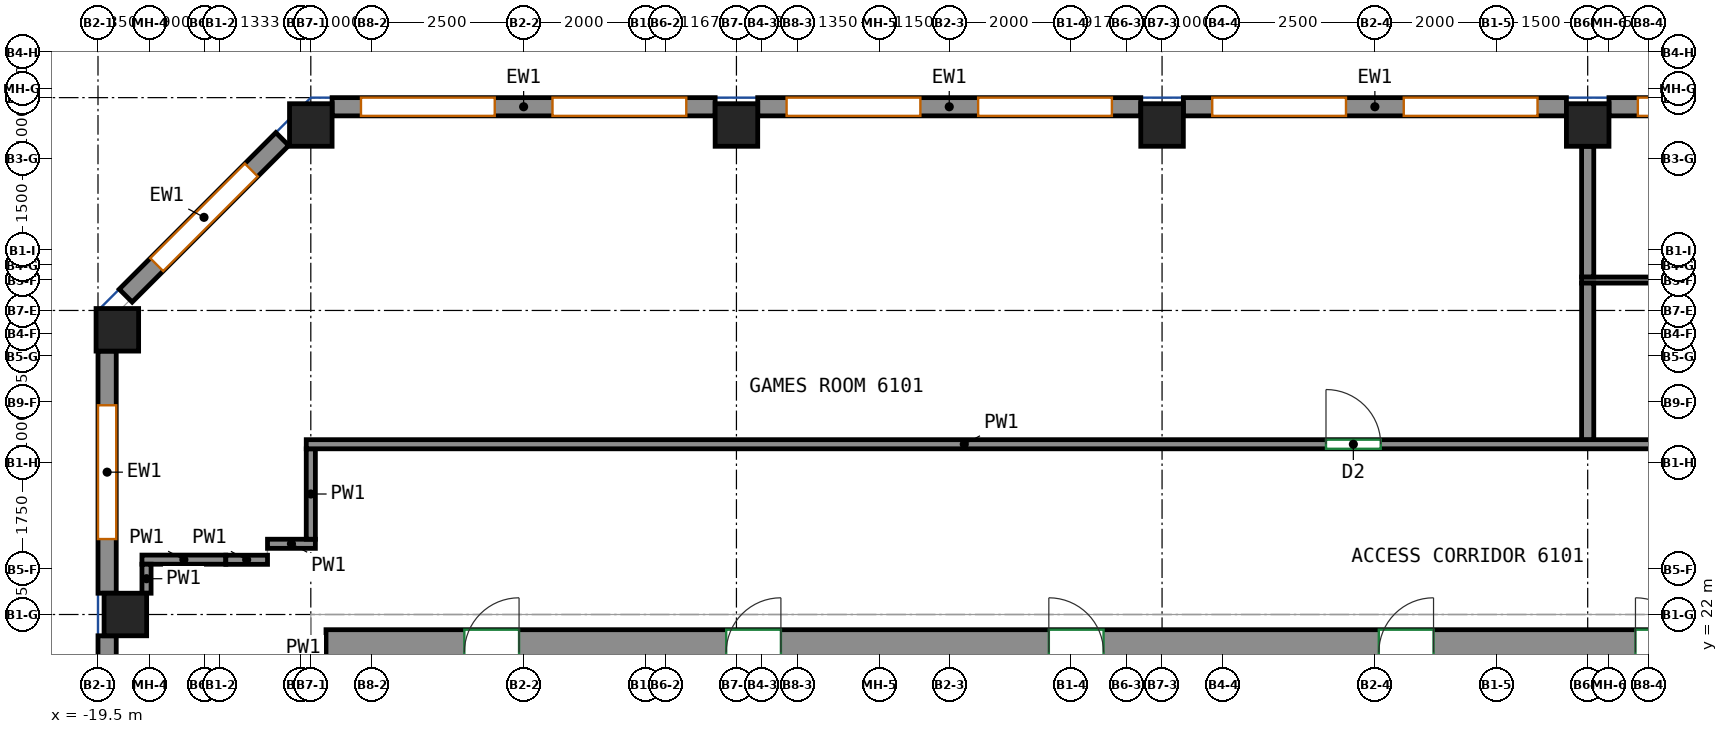
"""IFC4 building model, lengths in metres.
Left out: names, types, materials, properties, quantities, classifications, styles, units other than length and angle.
Written with IfcOpenShell. Run it as: python <this file> out.ifc"""

import sys

from ifc_helpers import new_model, si_unit, direction, frame, frame_2d, origin, origin_2d, place, context, subcontext, project, spatial, rectangle, extrude, source, transform, mapped, element, fill, save


model = new_model("IFC4")
c1 = context("Model", 3, precision=1e-05, world=origin(), true_north=direction((0.0, 1.0)))
c2 = subcontext(c1, "Body", "Model", "MODEL_VIEW")
j1 = project(units=[si_unit("LENGTHUNIT", "METRE"), si_unit("PLANEANGLEUNIT", "RADIAN")], contexts=[c1])
p1 = place(None, origin())
s1 = spatial("IfcSite", under=j1, at=p1, CompositionType="ELEMENT")
p2 = place(p1, origin())
s2 = spatial("IfcBuilding", under=s1, at=p2, CompositionType="ELEMENT")
p3 = place(p2, frame((0.0, 0.0, 252.6)))
s3 = spatial("IfcBuildingStorey", under=s2, at=p3, CompositionType="ELEMENT", Elevation=252.6)
m1 = source(origin(), c2, "Body", "SweptSolid", [
    extrude(rectangle(XDim=0.7, YDim=0.7, at=origin_2d()), origin(), (0.0, 0.0, 1.0), 3.12),
])
for number, where, z_axis, x_axis in (
    (1, (-19.182, 26.682, 0.0), (0.0, 0.0, 1.0), (1.0, 0.0, 0.0)),
    (2, (-19.05, 22.0, 0.0), (0.0, 0.0, 1.0), (1.0, 0.0, 0.0)),
    (3, (-16.0, 30.05, 0.0), (0.0, 0.0, 1.0), (1.0, 0.0, 0.0)),
    (4, (-9.0, 30.05, 0.0), (0.0, 0.0, 1.0), (1.0, 0.0, 0.0)),
    (5, (-2.0, 30.05, 0.0), (0.0, 0.0, 1.0), (1.0, 0.0, 0.0)),
    (6, (5.0, 30.05, 0.0), (0.0, 0.0, 1.0), (1.0, 0.0, 0.0)),
):
    element("IfcColumn", number, at=place(p3, frame(where, z_axis=z_axis, x_axis=x_axis)), inside=s3, PredefinedType="COLUMN", context=c2, shape_type="MappedRepresentation", body=[
        mapped(m1, transform((0.0, 0.0, 0.0))),
    ])
m2 = source(origin(), c2, "Body", "SweptSolid", [
    extrude(rectangle(XDim=33.6, YDim=0.75, at=frame_2d((16.8, 0.0))), origin(), (0.0, 0.0, 1.0), 3.12),
])
p4 = place(p3, frame((-15.75, 21.375, 0.0), z_axis=(0.0, 0.0, 1.0), x_axis=(1.0, 0.0, 0.0)))
e7 = element("IfcWall", 7, at=p4, inside=s3, PredefinedType="SHEAR", context=c2, shape_type="MappedRepresentation", body=[
    mapped(m2, transform((0.0, 0.0, 0.0))),
])
p5 = place(p4, frame((6.581, 0.0, 0.0)))
e8 = element("IfcOpeningElement", 8, at=p5, cuts=e7, PredefinedType="OPENING", context=c2, shape_type="SweptSolid", body=[
    extrude(rectangle(XDim=0.9, YDim=2.1, at=frame_2d((0.45, 1.05))), frame((0.0, 0.385, 0.0), z_axis=(0.0, -1.0, 0.0), x_axis=(1.0, 0.0, 0.0)), (0.0, 0.0, 1.0), 0.77),
])
p6 = place(p4, frame((11.888, 0.0, 0.0)))
e9 = element("IfcOpeningElement", 9, at=p6, cuts=e7, PredefinedType="OPENING", context=c2, shape_type="SweptSolid", body=[
    extrude(rectangle(XDim=0.9, YDim=2.1, at=frame_2d((0.45, 1.05))), frame((0.0, 0.385, 0.0), z_axis=(0.0, -1.0, 0.0), x_axis=(1.0, 0.0, 0.0)), (0.0, 0.0, 1.0), 0.77),
])
p7 = place(p4, frame((17.315, 0.0, 0.0)))
e10 = element("IfcOpeningElement", 10, at=p7, cuts=e7, PredefinedType="OPENING", context=c2, shape_type="SweptSolid", body=[
    extrude(rectangle(XDim=0.9, YDim=2.1, at=frame_2d((0.45, 1.05))), frame((0.0, 0.385, 0.0), z_axis=(0.0, -1.0, 0.0), x_axis=(1.0, 0.0, 0.0)), (0.0, 0.0, 1.0), 0.77),
])
p8 = place(p4, frame((21.536, 0.0, 0.0)))
e11 = element("IfcOpeningElement", 11, at=p8, cuts=e7, PredefinedType="OPENING", context=c2, shape_type="SweptSolid", body=[
    extrude(rectangle(XDim=0.9, YDim=2.1, at=frame_2d((0.45, 1.05))), frame((0.0, 0.385, 0.0), z_axis=(0.0, -1.0, 0.0), x_axis=(1.0, 0.0, 0.0)), (0.0, 0.0, 1.0), 0.77),
])
p9 = place(p4, frame((24.537, 0.0, 0.0)))
e12 = element("IfcOpeningElement", 12, at=p9, cuts=e7, PredefinedType="OPENING", context=c2, shape_type="SweptSolid", body=[
    extrude(rectangle(XDim=0.9, YDim=2.1, at=frame_2d((0.45, 1.05))), frame((0.0, 0.385, 0.0), z_axis=(0.0, -1.0, 0.0), x_axis=(1.0, 0.0, 0.0)), (0.0, 0.0, 1.0), 0.77),
])
p10 = place(p4, frame((27.07, 0.0, 0.0)))
e13 = element("IfcOpeningElement", 13, at=p10, cuts=e7, PredefinedType="OPENING", context=c2, shape_type="SweptSolid", body=[
    extrude(rectangle(XDim=0.9, YDim=2.1, at=frame_2d((0.45, 1.05))), frame((0.0, 0.385, 0.0), z_axis=(0.0, -1.0, 0.0), x_axis=(1.0, 0.0, 0.0)), (0.0, 0.0, 1.0), 0.77),
])
p11 = place(p4, frame((2.275, 0.0, 0.0)))
e14 = element("IfcOpeningElement", 14, at=p11, cuts=e7, PredefinedType="OPENING", context=c2, shape_type="SweptSolid", body=[
    extrude(rectangle(XDim=0.9, YDim=2.1, at=frame_2d((0.45, 1.05))), frame((0.0, 0.385, 0.0), z_axis=(0.0, -1.0, 0.0), x_axis=(1.0, 0.0, 0.0)), (0.0, 0.0, 1.0), 0.77),
])
p12 = place(p4, frame((30.425, 0.0, 0.0)))
e15 = element("IfcOpeningElement", 15, at=p12, cuts=e7, PredefinedType="OPENING", context=c2, shape_type="SweptSolid", body=[
    extrude(rectangle(XDim=0.9, YDim=2.1, at=frame_2d((0.45, 1.05))), frame((0.0, 0.385, 0.0), z_axis=(0.0, -1.0, 0.0), x_axis=(1.0, 0.0, 0.0)), (0.0, 0.0, 1.0), 0.77),
])
m3 = source(origin(), c2, "Body", "SweptSolid", [
    extrude(rectangle(XDim=6.3, YDim=0.3, at=frame_2d((3.15, 0.0))), origin(), (0.0, 0.0, 1.0), 3.12),
])
p13 = place(p3, frame((11.65, 30.35, 0.0), z_axis=(0.0, 0.0, 1.0), x_axis=(-1.0, 0.0, 0.0)))
e16 = element("IfcWall", 16, at=p13, inside=s3, PredefinedType="SOLIDWALL", context=c2, shape_type="MappedRepresentation", body=[
    mapped(m3, transform((0.0, 0.0, 0.0))),
])
p14 = place(p13, frame((0.475, 0.0, 0.8)))
e17 = element("IfcOpeningElement", 17, at=p14, cuts=e16, PredefinedType="OPENING", context=c2, shape_type="SweptSolid", body=[
    extrude(rectangle(XDim=2.2, YDim=2.05, at=frame_2d((1.1, 1.025))), frame((0.0, 0.16, 0.0), z_axis=(0.0, -1.0, 0.0), x_axis=(1.0, 0.0, 0.0)), (0.0, 0.0, 1.0), 0.32),
])
p15 = place(p13, frame((3.625, 0.0, 0.8)))
e18 = element("IfcOpeningElement", 18, at=p15, cuts=e16, PredefinedType="OPENING", context=c2, shape_type="SweptSolid", body=[
    extrude(rectangle(XDim=2.2, YDim=2.05, at=frame_2d((1.1, 1.025))), frame((0.0, 0.16, 0.0), z_axis=(0.0, -1.0, 0.0), x_axis=(1.0, 0.0, 0.0)), (0.0, 0.0, 1.0), 0.32),
])
p16 = place(p3, frame((4.65, 30.35, 0.0), z_axis=(0.0, 0.0, 1.0), x_axis=(-1.0, 0.0, 0.0)))
e19 = element("IfcWall", 19, at=p16, inside=s3, PredefinedType="SOLIDWALL", context=c2, shape_type="MappedRepresentation", body=[
    mapped(m3, transform((0.0, 0.0, 0.0))),
])
p17 = place(p16, frame((0.475, 0.0, 0.8)))
e20 = element("IfcOpeningElement", 20, at=p17, cuts=e19, PredefinedType="OPENING", context=c2, shape_type="SweptSolid", body=[
    extrude(rectangle(XDim=2.2, YDim=2.05, at=frame_2d((1.1, 1.025))), frame((0.0, 0.16, 0.0), z_axis=(0.0, -1.0, 0.0), x_axis=(1.0, 0.0, 0.0)), (0.0, 0.0, 1.0), 0.32),
])
p18 = place(p16, frame((3.625, 0.0, 0.8)))
e21 = element("IfcOpeningElement", 21, at=p18, cuts=e19, PredefinedType="OPENING", context=c2, shape_type="SweptSolid", body=[
    extrude(rectangle(XDim=2.2, YDim=2.05, at=frame_2d((1.1, 1.025))), frame((0.0, 0.16, 0.0), z_axis=(0.0, -1.0, 0.0), x_axis=(1.0, 0.0, 0.0)), (0.0, 0.0, 1.0), 0.32),
])
p19 = place(p3, frame((-2.35, 30.35, 0.0), z_axis=(0.0, 0.0, 1.0), x_axis=(-1.0, 0.0, 0.0)))
e22 = element("IfcWall", 22, at=p19, inside=s3, PredefinedType="SOLIDWALL", context=c2, shape_type="MappedRepresentation", body=[
    mapped(m3, transform((0.0, 0.0, 0.0))),
])
p20 = place(p19, frame((0.475, 0.0, 0.8)))
e23 = element("IfcOpeningElement", 23, at=p20, cuts=e22, PredefinedType="OPENING", context=c2, shape_type="SweptSolid", body=[
    extrude(rectangle(XDim=2.2, YDim=2.05, at=frame_2d((1.1, 1.025))), frame((0.0, 0.16, 0.0), z_axis=(0.0, -1.0, 0.0), x_axis=(1.0, 0.0, 0.0)), (0.0, 0.0, 1.0), 0.32),
])
p21 = place(p19, frame((3.625, 0.0, 0.8)))
e24 = element("IfcOpeningElement", 24, at=p21, cuts=e22, PredefinedType="OPENING", context=c2, shape_type="SweptSolid", body=[
    extrude(rectangle(XDim=2.2, YDim=2.05, at=frame_2d((1.1, 1.025))), frame((0.0, 0.16, 0.0), z_axis=(0.0, -1.0, 0.0), x_axis=(1.0, 0.0, 0.0)), (0.0, 0.0, 1.0), 0.32),
])
p22 = place(p3, frame((-9.35, 30.35, 0.0), z_axis=(0.0, 0.0, 1.0), x_axis=(-1.0, 0.0, 0.0)))
e25 = element("IfcWall", 25, at=p22, inside=s3, PredefinedType="SOLIDWALL", context=c2, shape_type="MappedRepresentation", body=[
    mapped(m3, transform((0.0, 0.0, 0.0))),
])
p23 = place(p22, frame((0.475, 0.0, 0.8)))
e26 = element("IfcOpeningElement", 26, at=p23, cuts=e25, PredefinedType="OPENING", context=c2, shape_type="SweptSolid", body=[
    extrude(rectangle(XDim=2.2, YDim=2.05, at=frame_2d((1.1, 1.025))), frame((0.0, 0.16, 0.0), z_axis=(0.0, -1.0, 0.0), x_axis=(1.0, 0.0, 0.0)), (0.0, 0.0, 1.0), 0.32),
])
p24 = place(p22, frame((3.625, 0.0, 0.8)))
e27 = element("IfcOpeningElement", 27, at=p24, cuts=e25, PredefinedType="OPENING", context=c2, shape_type="SweptSolid", body=[
    extrude(rectangle(XDim=2.2, YDim=2.05, at=frame_2d((1.1, 1.025))), frame((0.0, 0.16, 0.0), z_axis=(0.0, -1.0, 0.0), x_axis=(1.0, 0.0, 0.0)), (0.0, 0.0, 1.0), 0.32),
])
m4 = source(origin(), c2, "Body", "SweptSolid", [
    extrude(rectangle(XDim=3.642, YDim=0.3, at=frame_2d((1.821, 0.0))), origin(), (0.0, 0.0, 1.0), 3.12),
])
p25 = place(p3, frame((-16.469, 29.819, 0.0), z_axis=(0.0, 0.0, 1.0), x_axis=(-0.707106781187, -0.707106781187, 0.0)))
e28 = element("IfcWall", 28, at=p25, inside=s3, PredefinedType="SOLIDWALL", context=c2, shape_type="MappedRepresentation", body=[
    mapped(m4, transform((0.0, 0.0, 0.0))),
])
p26 = place(p25, frame((0.721, 0.0, 0.8)))
e29 = element("IfcOpeningElement", 29, at=p26, cuts=e28, PredefinedType="OPENING", context=c2, shape_type="SweptSolid", body=[
    extrude(rectangle(XDim=2.2, YDim=2.05, at=frame_2d((1.1, 1.025))), frame((0.0, 0.16, 0.0), z_axis=(0.0, -1.0, 0.0), x_axis=(1.0, 0.0, 0.0)), (0.0, 0.0, 1.0), 0.32),
])
m5 = source(origin(), c2, "Body", "SweptSolid", [
    extrude(rectangle(XDim=3.982, YDim=0.3, at=frame_2d((1.991, 0.0))), origin(), (0.0, 0.0, 1.0), 3.12),
])
p27 = place(p3, frame((-19.35, 26.332, 0.0), z_axis=(0.0, 0.0, 1.0), x_axis=(0.0, -1.0, 0.0)))
e30 = element("IfcWall", 30, at=p27, inside=s3, PredefinedType="SOLIDWALL", context=c2, shape_type="MappedRepresentation", body=[
    mapped(m5, transform((0.0, 0.0, 0.0))),
])
p28 = place(p27, frame((0.891, 0.0, 0.8)))
e31 = element("IfcOpeningElement", 31, at=p28, cuts=e30, PredefinedType="OPENING", context=c2, shape_type="SweptSolid", body=[
    extrude(rectangle(XDim=2.2, YDim=2.05, at=frame_2d((1.1, 1.025))), frame((0.0, 0.16, 0.0), z_axis=(0.0, -1.0, 0.0), x_axis=(1.0, 0.0, 0.0)), (0.0, 0.0, 1.0), 0.32),
])
m6 = source(origin(), c2, "Body", "SweptSolid", [
    extrude(rectangle(XDim=13.3, YDim=0.3, at=frame_2d((6.65, 0.0))), origin(), (0.0, 0.0, 1.0), 3.12),
])
p29 = place(p3, frame((-19.35, 21.65, 0.0), z_axis=(0.0, 0.0, 1.0), x_axis=(0.0, -1.0, 0.0)))
e32 = element("IfcWall", 32, at=p29, inside=s3, PredefinedType="SOLIDWALL", context=c2, shape_type="MappedRepresentation", body=[
    mapped(m6, transform((0.0, 0.0, 0.0))),
])
p30 = place(p29, frame((0.562, 0.0, 0.8)))
e33 = element("IfcOpeningElement", 33, at=p30, cuts=e32, PredefinedType="OPENING", context=c2, shape_type="SweptSolid", body=[
    extrude(rectangle(XDim=2.2, YDim=2.05, at=frame_2d((1.1, 1.025))), frame((0.0, 0.16, 0.0), z_axis=(0.0, -1.0, 0.0), x_axis=(1.0, 0.0, 0.0)), (0.0, 0.0, 1.0), 0.32),
])
p31 = place(p29, frame((3.887, 0.0, 0.8)))
e34 = element("IfcOpeningElement", 34, at=p31, cuts=e32, PredefinedType="OPENING", context=c2, shape_type="SweptSolid", body=[
    extrude(rectangle(XDim=2.2, YDim=2.05, at=frame_2d((1.1, 1.025))), frame((0.0, 0.16, 0.0), z_axis=(0.0, -1.0, 0.0), x_axis=(1.0, 0.0, 0.0)), (0.0, 0.0, 1.0), 0.32),
])
p32 = place(p29, frame((7.212, 0.0, 0.8)))
e35 = element("IfcOpeningElement", 35, at=p32, cuts=e32, PredefinedType="OPENING", context=c2, shape_type="SweptSolid", body=[
    extrude(rectangle(XDim=2.2, YDim=2.05, at=frame_2d((1.1, 1.025))), frame((0.0, 0.16, 0.0), z_axis=(0.0, -1.0, 0.0), x_axis=(1.0, 0.0, 0.0)), (0.0, 0.0, 1.0), 0.32),
])
p33 = place(p29, frame((10.538, 0.0, 0.8)))
e36 = element("IfcOpeningElement", 36, at=p33, cuts=e32, PredefinedType="OPENING", context=c2, shape_type="SweptSolid", body=[
    extrude(rectangle(XDim=2.2, YDim=2.05, at=frame_2d((1.1, 1.025))), frame((0.0, 0.16, 0.0), z_axis=(0.0, -1.0, 0.0), x_axis=(1.0, 0.0, 0.0)), (0.0, 0.0, 1.0), 0.32),
])
p34 = place(p3, frame((-17.398, 22.902, 0.0), z_axis=(0.0, 0.0, 1.0), x_axis=(-1.0, 0.0, 0.0)))
e37 = element("IfcWall", 37, at=p34, inside=s3, PredefinedType="PARTITIONING", context=c2, shape_type="SweptSolid", body=[
    extrude(rectangle(XDim=1.379, YDim=0.15, at=frame_2d((0.689, 0.0))), origin(), (0.0, 0.0, 1.0), 3.12),
])
p35 = place(p3, frame((-16.712, 22.9, 0.0), z_axis=(0.0, 0.0, 1.0), x_axis=(-1.0, 0.0, 0.0)))
e38 = element("IfcWall", 38, at=p35, inside=s3, PredefinedType="PARTITIONING", context=c2, shape_type="SweptSolid", body=[
    extrude(rectangle(XDim=0.686, YDim=0.15, at=frame_2d((0.343, 0.0))), origin(), (0.0, 0.0, 1.0), 3.12),
])
p36 = place(p3, frame((-15.925, 23.163, 0.0), z_axis=(0.0, 0.0, 1.0), x_axis=(-1.0, 0.0, 0.0)))
e39 = element("IfcWall", 39, at=p36, inside=s3, PredefinedType="PARTITIONING", context=c2, shape_type="SweptSolid", body=[
    extrude(rectangle(XDim=0.787, YDim=0.15, at=frame_2d((0.394, 0.0))), origin(), (0.0, 0.0, 1.0), 3.12),
])
p37 = place(p3, frame((-16.0, 23.238, 0.0), z_axis=(0.0, 0.0, 1.0), x_axis=(0.0, 1.0, 0.0)))
e40 = element("IfcWall", 40, at=p37, inside=s3, PredefinedType="PARTITIONING", context=c2, shape_type="SweptSolid", body=[
    extrude(rectangle(XDim=1.487, YDim=0.15, at=frame_2d((0.744, 0.0))), origin(), (0.0, 0.0, 1.0), 3.12),
])
p38 = place(p3, frame((-16.075, 24.8, 0.0), z_axis=(0.0, 0.0, 1.0), x_axis=(1.0, 0.0, 0.0)))
e41 = element("IfcWall", 41, at=p38, inside=s3, PredefinedType="PARTITIONING", context=c2, shape_type="SweptSolid", body=[
    extrude(rectangle(XDim=36.073, YDim=0.15, at=frame_2d((18.037, 0.0))), origin(), (0.0, 0.0, 1.0), 3.12),
])
p39 = place(p38, frame((16.771, 0.0, 0.0)))
e42 = element("IfcOpeningElement", 42, at=p39, cuts=e41, PredefinedType="OPENING", context=c2, shape_type="SweptSolid", body=[
    extrude(rectangle(XDim=0.9, YDim=2.1, at=frame_2d((0.45, 1.05))), frame((0.0, 0.085, 0.0), z_axis=(0.0, -1.0, 0.0), x_axis=(1.0, 0.0, 0.0)), (0.0, 0.0, 1.0), 0.17),
])
p40 = place(p38, frame((30.279, 0.0, 0.0)))
e43 = element("IfcOpeningElement", 43, at=p40, cuts=e41, PredefinedType="OPENING", context=c2, shape_type="SweptSolid", body=[
    extrude(rectangle(XDim=1.0, YDim=2.1, at=frame_2d((0.5, 1.05))), frame((0.0, 0.085, 0.0), z_axis=(0.0, -1.0, 0.0), x_axis=(1.0, 0.0, 0.0)), (0.0, 0.0, 1.0), 0.17),
])
p41 = place(p3, frame((-18.702, 22.827, 0.0), z_axis=(0.0, 0.0, 1.0), x_axis=(0.0, -1.0, 0.0)))
e44 = element("IfcWall", 44, at=p41, inside=s3, PredefinedType="PARTITIONING", context=c2, shape_type="SweptSolid", body=[
    extrude(rectangle(XDim=0.477, YDim=0.15, at=frame_2d((0.238, 0.0))), origin(), (0.0, 0.0, 1.0), 3.12),
])
p42 = place(p3, frame((4.9, 27.5, 0.0), z_axis=(0.0, 0.0, 1.0), x_axis=(1.0, 0.0, 0.0)))
e45 = element("IfcWall", 45, at=p42, inside=s3, PredefinedType="PARTITIONING", context=c2, shape_type="SweptSolid", body=[
    extrude(rectangle(XDim=17.798, YDim=0.1, at=frame_2d((8.899, 0.0))), origin(), (0.0, 0.0, 1.0), 3.12),
])
p43 = place(p42, frame((8.806, 0.0, 0.0)))
e46 = element("IfcOpeningElement", 46, at=p43, cuts=e45, PredefinedType="OPENING", context=c2, shape_type="SweptSolid", body=[
    extrude(rectangle(XDim=1.0, YDim=2.1, at=frame_2d((0.5, 1.05))), frame((0.0, 0.06, 0.0), z_axis=(0.0, -1.0, 0.0), x_axis=(1.0, 0.0, 0.0)), (0.0, 0.0, 1.0), 0.12),
])
p44 = place(p42, frame((10.897, 0.0, 0.0)))
e47 = element("IfcOpeningElement", 47, at=p44, cuts=e45, PredefinedType="OPENING", context=c2, shape_type="SweptSolid", body=[
    extrude(rectangle(XDim=1.0, YDim=2.1, at=frame_2d((0.5, 1.05))), frame((0.0, 0.06, 0.0), z_axis=(0.0, -1.0, 0.0), x_axis=(1.0, 0.0, 0.0)), (0.0, 0.0, 1.0), 0.12),
])
p45 = place(p3, frame((5.0, 24.877, 0.0), z_axis=(0.0, 0.0, 1.0), x_axis=(0.0, 1.0, 0.0)))
e48 = element("IfcWall", 48, at=p45, inside=s3, PredefinedType="PARTITIONING", context=c2, shape_type="SweptSolid", body=[
    extrude(rectangle(XDim=2.573, YDim=0.2, at=frame_2d((1.287, 0.0))), origin(), (0.0, 0.0, 1.0), 3.12),
])
p46 = place(p3, frame((5.0, 27.552, 0.0), z_axis=(0.0, 0.0, 1.0), x_axis=(0.0, 1.0, 0.0)))
e49 = element("IfcWall", 49, at=p46, inside=s3, PredefinedType="PARTITIONING", context=c2, shape_type="SweptSolid", body=[
    extrude(rectangle(XDim=2.148, YDim=0.2, at=frame_2d((1.074, 0.0))), origin(), (0.0, 0.0, 1.0), 3.12),
])
p47 = place(p15, origin())
e50 = element("IfcWindow", 50, at=p47, inside=s3, PartitioningType="SINGLE_PANEL", PredefinedType="WINDOW", context=c2, shape_type="SweptSolid", body=[
    extrude(rectangle(XDim=2.2, YDim=2.05, at=frame_2d((1.1, 1.025))), frame((0.0, 0.03, 0.0), z_axis=(0.0, -1.0, 0.0), x_axis=(1.0, 0.0, 0.0)), (0.0, 0.0, 1.0), 0.06),
])
fill(e18, e50)
p48 = place(p17, origin())
e51 = element("IfcWindow", 51, at=p48, inside=s3, PartitioningType="SINGLE_PANEL", PredefinedType="WINDOW", context=c2, shape_type="SweptSolid", body=[
    extrude(rectangle(XDim=2.2, YDim=2.05, at=frame_2d((1.1, 1.025))), frame((0.0, 0.03, 0.0), z_axis=(0.0, -1.0, 0.0), x_axis=(1.0, 0.0, 0.0)), (0.0, 0.0, 1.0), 0.06),
])
fill(e20, e51)
p49 = place(p18, origin())
e52 = element("IfcWindow", 52, at=p49, inside=s3, PartitioningType="SINGLE_PANEL", PredefinedType="WINDOW", context=c2, shape_type="SweptSolid", body=[
    extrude(rectangle(XDim=2.2, YDim=2.05, at=frame_2d((1.1, 1.025))), frame((0.0, 0.03, 0.0), z_axis=(0.0, -1.0, 0.0), x_axis=(1.0, 0.0, 0.0)), (0.0, 0.0, 1.0), 0.06),
])
fill(e21, e52)
p50 = place(p20, origin())
e53 = element("IfcWindow", 53, at=p50, inside=s3, PartitioningType="SINGLE_PANEL", PredefinedType="WINDOW", context=c2, shape_type="SweptSolid", body=[
    extrude(rectangle(XDim=2.2, YDim=2.05, at=frame_2d((1.1, 1.025))), frame((0.0, 0.03, 0.0), z_axis=(0.0, -1.0, 0.0), x_axis=(1.0, 0.0, 0.0)), (0.0, 0.0, 1.0), 0.06),
])
fill(e23, e53)
p51 = place(p21, origin())
e54 = element("IfcWindow", 54, at=p51, inside=s3, PartitioningType="SINGLE_PANEL", PredefinedType="WINDOW", context=c2, shape_type="SweptSolid", body=[
    extrude(rectangle(XDim=2.2, YDim=2.05, at=frame_2d((1.1, 1.025))), frame((0.0, 0.03, 0.0), z_axis=(0.0, -1.0, 0.0), x_axis=(1.0, 0.0, 0.0)), (0.0, 0.0, 1.0), 0.06),
])
fill(e24, e54)
p52 = place(p23, origin())
e55 = element("IfcWindow", 55, at=p52, inside=s3, PartitioningType="SINGLE_PANEL", PredefinedType="WINDOW", context=c2, shape_type="SweptSolid", body=[
    extrude(rectangle(XDim=2.2, YDim=2.05, at=frame_2d((1.1, 1.025))), frame((0.0, 0.03, 0.0), z_axis=(0.0, -1.0, 0.0), x_axis=(1.0, 0.0, 0.0)), (0.0, 0.0, 1.0), 0.06),
])
fill(e26, e55)
p53 = place(p24, origin())
e56 = element("IfcWindow", 56, at=p53, inside=s3, PartitioningType="SINGLE_PANEL", PredefinedType="WINDOW", context=c2, shape_type="SweptSolid", body=[
    extrude(rectangle(XDim=2.2, YDim=2.05, at=frame_2d((1.1, 1.025))), frame((0.0, 0.03, 0.0), z_axis=(0.0, -1.0, 0.0), x_axis=(1.0, 0.0, 0.0)), (0.0, 0.0, 1.0), 0.06),
])
fill(e27, e56)
p54 = place(p26, origin())
e57 = element("IfcWindow", 57, at=p54, inside=s3, PartitioningType="SINGLE_PANEL", PredefinedType="WINDOW", context=c2, shape_type="SweptSolid", body=[
    extrude(rectangle(XDim=2.2, YDim=2.05, at=frame_2d((1.1, 1.025))), frame((0.0, 0.03, 0.0), z_axis=(0.0, -1.0, 0.0), x_axis=(1.0, 0.0, 0.0)), (0.0, 0.0, 1.0), 0.06),
])
fill(e29, e57)
p55 = place(p28, origin())
e58 = element("IfcWindow", 58, at=p55, inside=s3, PartitioningType="SINGLE_PANEL", PredefinedType="WINDOW", context=c2, shape_type="SweptSolid", body=[
    extrude(rectangle(XDim=2.2, YDim=2.05, at=frame_2d((1.1, 1.025))), frame((0.0, 0.03, 0.0), z_axis=(0.0, -1.0, 0.0), x_axis=(1.0, 0.0, 0.0)), (0.0, 0.0, 1.0), 0.06),
])
fill(e31, e58)
p56 = place(p39, origin())
e59 = element("IfcDoor", 59, at=p56, inside=s3, OperationType="SINGLE_SWING_LEFT", PredefinedType="DOOR", context=c2, shape_type="SweptSolid", body=[
    extrude(rectangle(XDim=0.9, YDim=2.1, at=frame_2d((0.45, 1.05))), frame((0.0, 0.025, 0.0), z_axis=(0.0, -1.0, 0.0), x_axis=(1.0, 0.0, 0.0)), (0.0, 0.0, 1.0), 0.05),
])
fill(e42, e59)
save(model, sys.argv[1])
